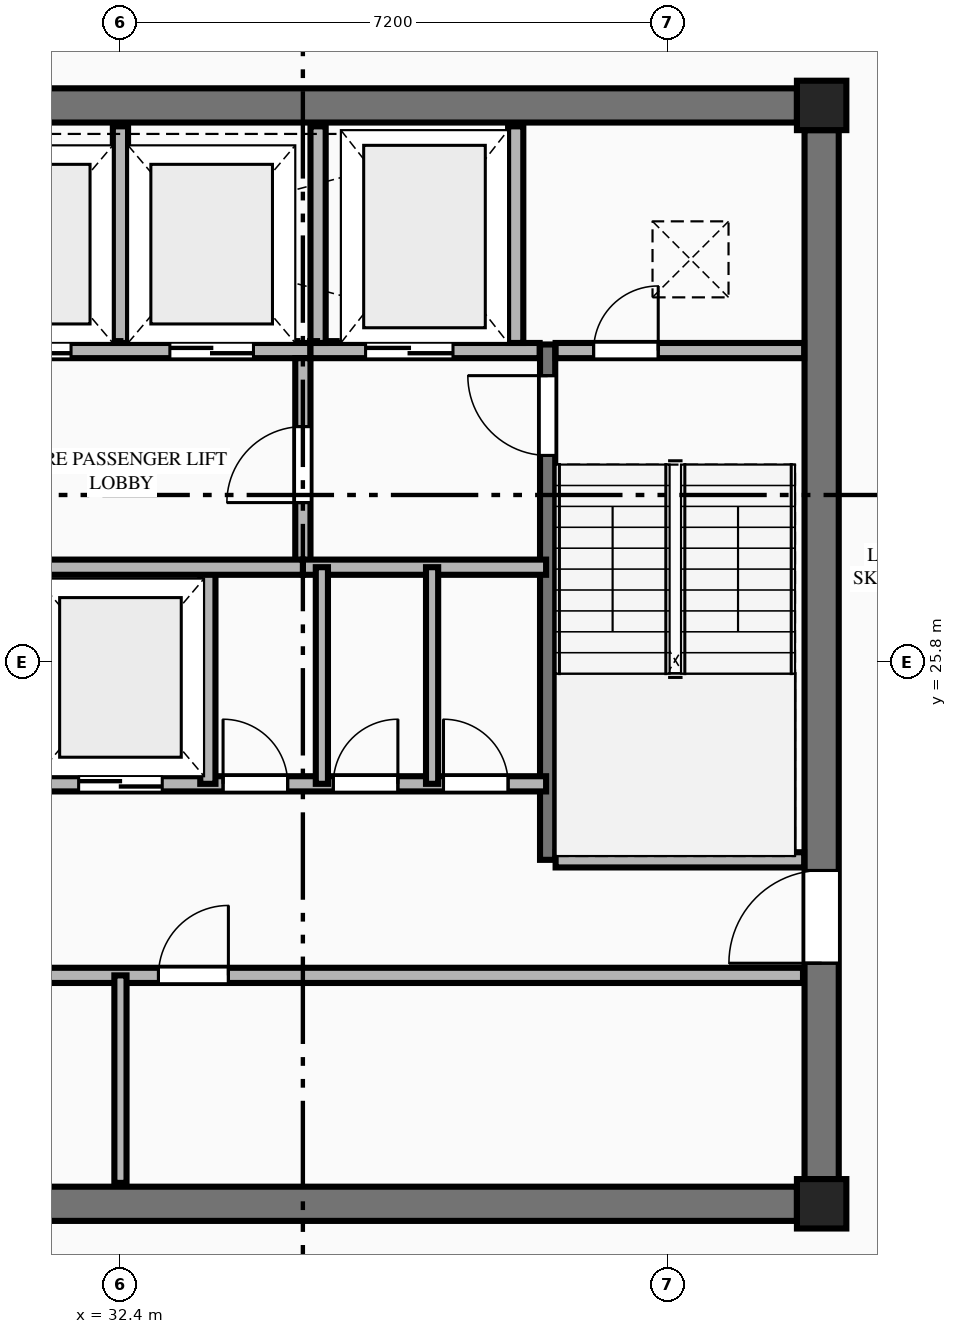
"""IFC4 building model, lengths in metres.
Left out: names, types, materials, properties, quantities, classifications, styles, units other than length and angle.
Written with IfcOpenShell. Run it as: python <this file> out.ifc"""

import sys

from ifc_helpers import new_model, si_unit, direction, frame, frame_2d, origin, origin_2d, place, context, subcontext, project, spatial, rectangle, extrude, element, fill, save


model = new_model("IFC4")
c1 = context("Model", 3, precision=1e-05, world=origin(), true_north=direction((0.0, 1.0)))
c2 = subcontext(c1, "Body", "Model", "MODEL_VIEW")
j1 = project(units=[si_unit("LENGTHUNIT", "METRE"), si_unit("PLANEANGLEUNIT", "RADIAN")], contexts=[c1])
p1 = place(None, origin())
s1 = spatial("IfcSite", under=j1, at=p1, CompositionType="ELEMENT")
p2 = place(p1, origin())
s2 = spatial("IfcBuilding", under=s1, at=p2, CompositionType="ELEMENT")
p3 = place(p2, frame((0.0, 0.0, 248.9)))
s3 = spatial("IfcBuildingStorey", under=s2, at=p3, CompositionType="ELEMENT", Elevation=248.9)
for number, where, z_axis, x_axis in (
    (1, (41.625, 18.675, 0.0), (0.0, 0.0, 1.0), (1.0, 0.0, 0.0)),
    (2, (41.625, 33.125, 0.0), (0.0, 0.0, 1.0), (1.0, 0.0, 0.0)),
):
    element("IfcColumn", number, at=place(p3, frame(where, z_axis=z_axis, x_axis=x_axis)), inside=s3, PredefinedType="COLUMN", context=c2, shape_type="SweptSolid", body=[
        extrude(rectangle(XDim=0.65, YDim=0.65, at=origin_2d()), origin(), (0.0, 0.0, 1.0), 3.65),
    ])
for number, where, z_axis, x_axis in (
    (3, (23.5, 18.675, 0.0), (0.0, 0.0, 1.0), (1.0, 0.0, 0.0)),
    (4, (23.5, 33.125, 0.0), (0.0, 0.0, 1.0), (1.0, 0.0, 0.0)),
):
    element("IfcWall", number, at=place(p3, frame(where, z_axis=z_axis, x_axis=x_axis)), inside=s3, PredefinedType="SHEAR", context=c2, shape_type="SweptSolid", body=[
        extrude(rectangle(XDim=17.8, YDim=0.45, at=frame_2d((8.9, 0.0))), origin(), (0.0, 0.0, 1.0), 3.45),
    ])
p4 = place(p3, frame((41.625, 19.0, 0.0), z_axis=(0.0, 0.0, 1.0), x_axis=(0.0, 1.0, 0.0)))
e5 = element("IfcWall", 5, at=p4, inside=s3, PredefinedType="SHEAR", context=c2, shape_type="SweptSolid", body=[
    extrude(rectangle(XDim=13.8, YDim=0.45, at=frame_2d((6.9, 0.0))), origin(), (0.0, 0.0, 1.0), 3.45),
])
p5 = place(p4, frame((2.84, 0.0, 0.0)))
e6 = element("IfcOpeningElement", 6, at=p5, cuts=e5, PredefinedType="OPENING", context=c2, shape_type="SweptSolid", body=[
    extrude(rectangle(XDim=1.22, YDim=2.25, at=frame_2d((0.61, 1.125))), frame((0.0, 0.235, 0.0), z_axis=(0.0, -1.0, 0.0), x_axis=(1.0, 0.0, 0.0)), (0.0, 0.0, 1.0), 0.47),
])
p6 = place(p3, frame((38.02, 23.2, 0.0), z_axis=(0.0, 0.0, 1.0), x_axis=(0.0, 1.0, 0.0)))
e7 = element("IfcWall", 7, at=p6, inside=s3, PredefinedType="SHEAR", context=c2, shape_type="SweptSolid", body=[
    extrude(rectangle(XDim=6.78, YDim=0.2, at=frame_2d((3.39, 0.0))), origin(), (0.0, 0.0, 1.0), 3.65),
])
p7 = place(p6, frame((5.32, 0.0, 0.0)))
e8 = element("IfcOpeningElement", 8, at=p7, cuts=e7, PredefinedType="OPENING", context=c2, shape_type="SweptSolid", body=[
    extrude(rectangle(XDim=1.05, YDim=2.15, at=frame_2d((0.525, 1.075))), frame((0.0, 0.11, 0.0), z_axis=(0.0, -1.0, 0.0), x_axis=(1.0, 0.0, 0.0)), (0.0, 0.0, 1.0), 0.22),
])
p8 = place(p3, frame((38.125, 23.2, 0.0), z_axis=(0.0, 0.0, 1.0), x_axis=(1.0, 0.0, 0.0)))
e9 = element("IfcWall", 9, at=p8, inside=s3, PredefinedType="PLUMBINGWALL", context=c2, shape_type="SweptSolid", body=[
    extrude(rectangle(XDim=3.27, YDim=0.2, at=frame_2d((1.635, 0.0))), origin(), (0.0, 0.0, 1.0), 3.45),
])
p9 = place(p3, frame((29.9, 29.9, 0.0), z_axis=(0.0, 0.0, 1.0), x_axis=(1.0, 0.0, 0.0)))
e10 = element("IfcWall", 10, at=p9, inside=s3, PredefinedType="PLUMBINGWALL", context=c2, shape_type="SweptSolid", body=[
    extrude(rectangle(XDim=5.0, YDim=0.2, at=frame_2d((2.5, 0.0))), origin(), (0.0, 0.0, 1.0), 3.45),
])
p10 = place(p9, frame((0.75, 0.0, 0.0)))
e11 = element("IfcOpeningElement", 11, at=p10, cuts=e10, PredefinedType="OPENING", context=c2, shape_type="SweptSolid", body=[
    extrude(rectangle(XDim=1.1, YDim=2.2, at=frame_2d((0.55, 1.1))), frame((0.0, 0.11, 0.0), z_axis=(0.0, -1.0, 0.0), x_axis=(1.0, 0.0, 0.0)), (0.0, 0.0, 1.0), 0.22),
])
p11 = place(p9, frame((3.15, 0.0, 0.0)))
e12 = element("IfcOpeningElement", 12, at=p11, cuts=e10, PredefinedType="OPENING", context=c2, shape_type="SweptSolid", body=[
    extrude(rectangle(XDim=1.1, YDim=2.2, at=frame_2d((0.55, 1.1))), frame((0.0, 0.11, 0.0), z_axis=(0.0, -1.0, 0.0), x_axis=(1.0, 0.0, 0.0)), (0.0, 0.0, 1.0), 0.22),
])
p12 = place(p3, frame((34.9, 29.9, 0.0), z_axis=(0.0, 0.0, 1.0), x_axis=(1.0, 0.0, 0.0)))
e13 = element("IfcWall", 13, at=p12, inside=s3, PredefinedType="PLUMBINGWALL", context=c2, shape_type="SweptSolid", body=[
    extrude(rectangle(XDim=3.015, YDim=0.2, at=frame_2d((1.508, 0.0))), origin(), (0.0, 0.0, 1.0), 3.45),
])
p13 = place(p12, frame((0.725, 0.0, 0.0)))
e14 = element("IfcOpeningElement", 14, at=p13, cuts=e13, PredefinedType="OPENING", context=c2, shape_type="SweptSolid", body=[
    extrude(rectangle(XDim=1.15, YDim=2.2, at=frame_2d((0.575, 1.1))), frame((0.0, 0.11, 0.0), z_axis=(0.0, -1.0, 0.0), x_axis=(1.0, 0.0, 0.0)), (0.0, 0.0, 1.0), 0.22),
])
p14 = place(p3, frame((38.125, 29.9, 0.0), z_axis=(0.0, 0.0, 1.0), x_axis=(1.0, 0.0, 0.0)))
e15 = element("IfcWall", 15, at=p14, inside=s3, PredefinedType="PLUMBINGWALL", context=c2, shape_type="SweptSolid", body=[
    extrude(rectangle(XDim=3.27, YDim=0.2, at=frame_2d((1.635, 0.0))), origin(), (0.0, 0.0, 1.0), 3.45),
])
p15 = place(p14, frame((0.5, 0.0, 0.0)))
e16 = element("IfcOpeningElement", 16, at=p15, cuts=e15, PredefinedType="OPENING", context=c2, shape_type="SweptSolid", body=[
    extrude(rectangle(XDim=0.85, YDim=2.05, at=frame_2d((0.425, 1.025))), frame((0.0, 0.11, 0.0), z_axis=(0.0, -1.0, 0.0), x_axis=(1.0, 0.0, 0.0)), (0.0, 0.0, 1.0), 0.22),
])
for number, where, z_axis, x_axis in (
    (17, (32.4, 30.0, 0.0), (0.0, 0.0, 1.0), (0.0, 1.0, 0.0)),
    (18, (35.0, 30.0, 0.0), (0.0, 0.0, 1.0), (0.0, 1.0, 0.0)),
    (19, (37.6, 30.0, 0.0), (0.0, 0.0, 1.0), (0.0, 1.0, 0.0)),
):
    element("IfcWall", number, at=place(p3, frame(where, z_axis=z_axis, x_axis=x_axis)), inside=s3, PredefinedType="PLUMBINGWALL", context=c2, shape_type="SweptSolid", body=[
        extrude(rectangle(XDim=2.85, YDim=0.2, at=frame_2d((1.425, 0.0))), origin(), (0.0, 0.0, 1.0), 3.45),
    ])
p16 = place(p3, frame((34.8, 27.05, 0.0), z_axis=(0.0, 0.0, 1.0), x_axis=(0.0, 1.0, 0.0)))
e20 = element("IfcWall", 20, at=p16, inside=s3, PredefinedType="PLUMBINGWALL", context=c2, shape_type="SweptSolid", body=[
    extrude(rectangle(XDim=2.75, YDim=0.2, at=frame_2d((1.375, 0.0))), origin(), (0.0, 0.0, 1.0), 3.45),
])
p17 = place(p16, frame((0.85, 0.0, 0.0)))
e21 = element("IfcOpeningElement", 21, at=p17, cuts=e20, PredefinedType="OPENING", context=c2, shape_type="SweptSolid", body=[
    extrude(rectangle(XDim=1.0, YDim=2.15, at=frame_2d((0.5, 1.075))), frame((0.0, 0.11, 0.0), z_axis=(0.0, -1.0, 0.0), x_axis=(1.0, 0.0, 0.0)), (0.0, 0.0, 1.0), 0.22),
])
p18 = place(p3, frame((34.8, 27.05, 0.0), z_axis=(0.0, 0.0, 1.0), x_axis=(1.0, 0.0, 0.0)))
e22 = element("IfcWall", 22, at=p18, inside=s3, PredefinedType="PLUMBINGWALL", context=c2, shape_type="SweptSolid", body=[
    extrude(rectangle(XDim=3.2, YDim=0.2, at=frame_2d((1.6, 0.0))), origin(), (0.0, 0.0, 1.0), 3.45),
])
p19 = place(p3, frame((31.2, 24.2, 0.0), z_axis=(0.0, 0.0, 1.0), x_axis=(1.0, 0.0, 0.0)))
e23 = element("IfcWall", 23, at=p19, inside=s3, PredefinedType="PLUMBINGWALL", context=c2, shape_type="SweptSolid", body=[
    extrude(rectangle(XDim=6.8, YDim=0.2, at=frame_2d((3.4, 0.0))), origin(), (0.0, 0.0, 1.0), 3.45),
])
p20 = place(p19, frame((0.65, 0.0, 0.0)))
e24 = element("IfcOpeningElement", 24, at=p20, cuts=e23, PredefinedType="OPENING", context=c2, shape_type="SweptSolid", body=[
    extrude(rectangle(XDim=1.1, YDim=2.2, at=frame_2d((0.55, 1.1))), frame((0.0, 0.11, 0.0), z_axis=(0.0, -1.0, 0.0), x_axis=(1.0, 0.0, 0.0)), (0.0, 0.0, 1.0), 0.22),
])
p21 = place(p19, frame((2.55, 0.0, 0.0)))
e25 = element("IfcOpeningElement", 25, at=p21, cuts=e23, PredefinedType="OPENING", context=c2, shape_type="SweptSolid", body=[
    extrude(rectangle(XDim=0.85, YDim=2.05, at=frame_2d((0.425, 1.025))), frame((0.0, 0.11, 0.0), z_axis=(0.0, -1.0, 0.0), x_axis=(1.0, 0.0, 0.0)), (0.0, 0.0, 1.0), 0.22),
])
p22 = place(p19, frame((4.0, 0.0, 0.0)))
e26 = element("IfcOpeningElement", 26, at=p22, cuts=e23, PredefinedType="OPENING", context=c2, shape_type="SweptSolid", body=[
    extrude(rectangle(XDim=0.85, YDim=2.05, at=frame_2d((0.425, 1.025))), frame((0.0, 0.11, 0.0), z_axis=(0.0, -1.0, 0.0), x_axis=(1.0, 0.0, 0.0)), (0.0, 0.0, 1.0), 0.22),
])
p23 = place(p19, frame((5.45, 0.0, 0.0)))
e27 = element("IfcOpeningElement", 27, at=p23, cuts=e23, PredefinedType="OPENING", context=c2, shape_type="SweptSolid", body=[
    extrude(rectangle(XDim=0.85, YDim=2.05, at=frame_2d((0.425, 1.025))), frame((0.0, 0.11, 0.0), z_axis=(0.0, -1.0, 0.0), x_axis=(1.0, 0.0, 0.0)), (0.0, 0.0, 1.0), 0.22),
])
p24 = place(p3, frame((33.55, 24.2, 0.0), z_axis=(0.0, 0.0, 1.0), x_axis=(0.0, 1.0, 0.0)))
e28 = element("IfcWall", 28, at=p24, inside=s3, PredefinedType="PLUMBINGWALL", context=c2, shape_type="SweptSolid", body=[
    extrude(rectangle(XDim=2.85, YDim=0.2, at=frame_2d((1.425, 0.0))), origin(), (0.0, 0.0, 1.0), 3.45),
])
p25 = place(p3, frame((31.25, 27.05, 0.0), z_axis=(0.0, 0.0, 1.0), x_axis=(1.0, 0.0, 0.0)))
e29 = element("IfcWall", 29, at=p25, inside=s3, PredefinedType="PLUMBINGWALL", context=c2, shape_type="SweptSolid", body=[
    extrude(rectangle(XDim=3.55, YDim=0.2, at=frame_2d((1.775, 0.0))), origin(), (0.0, 0.0, 1.0), 3.45),
])
for number, where, z_axis, x_axis in (
    (30, (35.05, 24.2, 0.0), (0.0, 0.0, 1.0), (0.0, 1.0, 0.0)),
    (31, (36.5, 24.2, 0.0), (0.0, 0.0, 1.0), (0.0, 1.0, 0.0)),
):
    element("IfcWall", number, at=place(p3, frame(where, z_axis=z_axis, x_axis=x_axis)), inside=s3, PredefinedType="PARTITIONING", context=c2, shape_type="SweptSolid", body=[
        extrude(rectangle(XDim=2.85, YDim=0.16, at=frame_2d((1.425, 0.0))), origin(), (0.0, 0.0, 1.0), 3.45),
    ])
p26 = place(p3, frame((23.42, 21.68, 0.0), z_axis=(0.0, 0.0, 1.0), x_axis=(1.0, 0.0, 0.0)))
e32 = element("IfcWall", 32, at=p26, inside=s3, PredefinedType="PLUMBINGWALL", context=c2, shape_type="SweptSolid", body=[
    extrude(rectangle(XDim=17.96, YDim=0.2, at=frame_2d((8.98, 0.0))), origin(), (0.0, 0.0, 1.0), 3.45),
])
p27 = place(p26, frame((0.46, 0.0, 0.0)))
e33 = element("IfcOpeningElement", 33, at=p27, cuts=e32, PredefinedType="OPENING", context=c2, shape_type="SweptSolid", body=[
    extrude(rectangle(XDim=0.92, YDim=2.15, at=frame_2d((0.46, 1.075))), frame((0.0, 0.11, 0.0), z_axis=(0.0, -1.0, 0.0), x_axis=(1.0, 0.0, 0.0)), (0.0, 0.0, 1.0), 0.22),
])
p28 = place(p26, frame((9.48, 0.0, 0.0)))
e34 = element("IfcOpeningElement", 34, at=p28, cuts=e32, PredefinedType="OPENING", context=c2, shape_type="SweptSolid", body=[
    extrude(rectangle(XDim=0.92, YDim=2.15, at=frame_2d((0.46, 1.075))), frame((0.0, 0.11, 0.0), z_axis=(0.0, -1.0, 0.0), x_axis=(1.0, 0.0, 0.0)), (0.0, 0.0, 1.0), 0.22),
])
p29 = place(p3, frame((32.4, 18.95, 0.0), z_axis=(0.0, 0.0, 1.0), x_axis=(0.0, 1.0, 0.0)))
e35 = element("IfcWall", 35, at=p29, inside=s3, PredefinedType="PARTITIONING", context=c2, shape_type="SweptSolid", body=[
    extrude(rectangle(XDim=2.73, YDim=0.16, at=frame_2d((1.365, 0.0))), origin(), (0.0, 0.0, 1.0), 3.45),
])
p30 = place(p5, origin())
e36 = element("IfcDoor", 36, at=p30, inside=s3, OperationType="SINGLE_SWING_LEFT", PredefinedType="DOOR", context=c2, shape_type="SweptSolid", body=[
    extrude(rectangle(XDim=1.22, YDim=2.25, at=frame_2d((0.61, 1.125))), frame((0.0, 0.025, 0.0), z_axis=(0.0, -1.0, 0.0), x_axis=(1.0, 0.0, 0.0)), (0.0, 0.0, 1.0), 0.05),
])
fill(e6, e36)
p31 = place(p7, origin())
e37 = element("IfcDoor", 37, at=p31, inside=s3, OperationType="SINGLE_SWING_RIGHT", PredefinedType="DOOR", context=c2, shape_type="SweptSolid", body=[
    extrude(rectangle(XDim=1.05, YDim=2.15, at=frame_2d((0.525, 1.075))), frame((0.0, 0.025, 0.0), z_axis=(0.0, -1.0, 0.0), x_axis=(1.0, 0.0, 0.0)), (0.0, 0.0, 1.0), 0.05),
])
fill(e8, e37)
p32 = place(p15, origin())
e38 = element("IfcDoor", 38, at=p32, inside=s3, OperationType="SINGLE_SWING_RIGHT", PredefinedType="DOOR", context=c2, shape_type="SweptSolid", body=[
    extrude(rectangle(XDim=0.85, YDim=2.05, at=frame_2d((0.425, 1.025))), frame((0.0, 0.025, 0.0), z_axis=(0.0, -1.0, 0.0), x_axis=(1.0, 0.0, 0.0)), (0.0, 0.0, 1.0), 0.05),
])
fill(e16, e38)
p33 = place(p13, origin())
e39 = element("IfcDoor", 39, at=p33, inside=s3, OperationType="DOUBLE_DOOR_SLIDING", PredefinedType="DOOR", context=c2, shape_type="SweptSolid", body=[
    extrude(rectangle(XDim=1.15, YDim=2.2, at=frame_2d((0.575, 1.1))), frame((0.0, 0.025, 0.0), z_axis=(0.0, -1.0, 0.0), x_axis=(1.0, 0.0, 0.0)), (0.0, 0.0, 1.0), 0.05),
])
fill(e14, e39)
p34 = place(p10, origin())
e40 = element("IfcDoor", 40, at=p34, inside=s3, OperationType="DOUBLE_DOOR_SLIDING", PredefinedType="DOOR", context=c2, shape_type="SweptSolid", body=[
    extrude(rectangle(XDim=1.1, YDim=2.2, at=frame_2d((0.55, 1.1))), frame((0.0, 0.025, 0.0), z_axis=(0.0, -1.0, 0.0), x_axis=(1.0, 0.0, 0.0)), (0.0, 0.0, 1.0), 0.05),
])
fill(e11, e40)
p35 = place(p11, origin())
e41 = element("IfcDoor", 41, at=p35, inside=s3, OperationType="DOUBLE_DOOR_SLIDING", PredefinedType="DOOR", context=c2, shape_type="SweptSolid", body=[
    extrude(rectangle(XDim=1.1, YDim=2.2, at=frame_2d((0.55, 1.1))), frame((0.0, 0.025, 0.0), z_axis=(0.0, -1.0, 0.0), x_axis=(1.0, 0.0, 0.0)), (0.0, 0.0, 1.0), 0.05),
])
fill(e12, e41)
p36 = place(p17, origin())
e42 = element("IfcDoor", 42, at=p36, inside=s3, OperationType="SINGLE_SWING_LEFT", PredefinedType="DOOR", context=c2, shape_type="SweptSolid", body=[
    extrude(rectangle(XDim=1.0, YDim=2.15, at=frame_2d((0.5, 1.075))), frame((0.0, 0.025, 0.0), z_axis=(0.0, -1.0, 0.0), x_axis=(1.0, 0.0, 0.0)), (0.0, 0.0, 1.0), 0.05),
])
fill(e21, e42)
p37 = place(p20, origin())
e43 = element("IfcDoor", 43, at=p37, inside=s3, OperationType="DOUBLE_DOOR_SLIDING", PredefinedType="DOOR", context=c2, shape_type="SweptSolid", body=[
    extrude(rectangle(XDim=1.1, YDim=2.2, at=frame_2d((0.55, 1.1))), frame((0.0, 0.025, 0.0), z_axis=(0.0, -1.0, 0.0), x_axis=(1.0, 0.0, 0.0)), (0.0, 0.0, 1.0), 0.05),
])
fill(e24, e43)
p38 = place(p21, origin())
e44 = element("IfcDoor", 44, at=p38, inside=s3, OperationType="SINGLE_SWING_LEFT", PredefinedType="DOOR", context=c2, shape_type="SweptSolid", body=[
    extrude(rectangle(XDim=0.85, YDim=2.05, at=frame_2d((0.425, 1.025))), frame((0.0, 0.025, 0.0), z_axis=(0.0, -1.0, 0.0), x_axis=(1.0, 0.0, 0.0)), (0.0, 0.0, 1.0), 0.05),
])
fill(e25, e44)
p39 = place(p22, origin())
e45 = element("IfcDoor", 45, at=p39, inside=s3, OperationType="SINGLE_SWING_RIGHT", PredefinedType="DOOR", context=c2, shape_type="SweptSolid", body=[
    extrude(rectangle(XDim=0.85, YDim=2.05, at=frame_2d((0.425, 1.025))), frame((0.0, 0.025, 0.0), z_axis=(0.0, -1.0, 0.0), x_axis=(1.0, 0.0, 0.0)), (0.0, 0.0, 1.0), 0.05),
])
fill(e26, e45)
p40 = place(p23, origin())
e46 = element("IfcDoor", 46, at=p40, inside=s3, OperationType="SINGLE_SWING_LEFT", PredefinedType="DOOR", context=c2, shape_type="SweptSolid", body=[
    extrude(rectangle(XDim=0.85, YDim=2.05, at=frame_2d((0.425, 1.025))), frame((0.0, 0.025, 0.0), z_axis=(0.0, -1.0, 0.0), x_axis=(1.0, 0.0, 0.0)), (0.0, 0.0, 1.0), 0.05),
])
fill(e27, e46)
p41 = place(p28, origin())
e47 = element("IfcDoor", 47, at=p41, inside=s3, OperationType="SINGLE_SWING_RIGHT", PredefinedType="DOOR", context=c2, shape_type="SweptSolid", body=[
    extrude(rectangle(XDim=0.92, YDim=2.15, at=frame_2d((0.46, 1.075))), frame((0.0, 0.025, 0.0), z_axis=(0.0, -1.0, 0.0), x_axis=(1.0, 0.0, 0.0)), (0.0, 0.0, 1.0), 0.05),
])
fill(e34, e47)
save(model, sys.argv[1])
